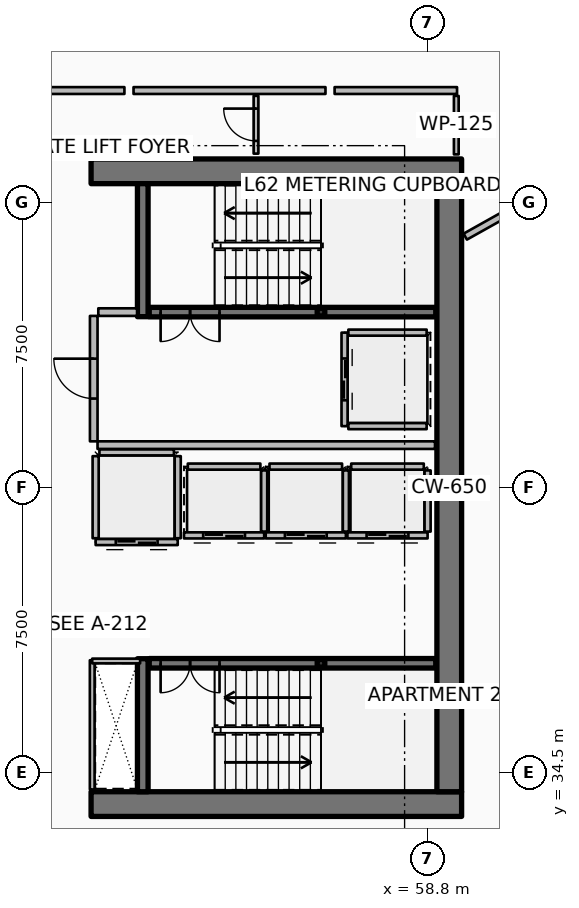
"""IFC4 building model, lengths in metres.
Left out: names, types, materials, properties, quantities, classifications, styles, units other than length and angle.
Written with IfcOpenShell. Run it as: python <this file> out.ifc"""

import sys

from ifc_helpers import new_model, si_unit, direction, frame, frame_2d, origin, origin_2d, place, context, subcontext, project, spatial, rectangle, hollow_rectangle, extrude, element, fill, save


model = new_model("IFC4")
c1 = context("Model", 3, precision=1e-05, world=origin(), true_north=direction((0.0, 1.0)))
c2 = subcontext(c1, "Body", "Model", "MODEL_VIEW")
j1 = project(units=[si_unit("LENGTHUNIT", "METRE"), si_unit("PLANEANGLEUNIT", "RADIAN")], contexts=[c1])
p1 = place(None, origin())
s1 = spatial("IfcSite", under=j1, at=p1, CompositionType="ELEMENT")
p2 = place(p1, origin())
s2 = spatial("IfcBuilding", under=s1, at=p2, CompositionType="ELEMENT")
p3 = place(p2, frame((0.0, 0.0, 248.25)))
s3 = spatial("IfcBuildingStorey", under=s2, at=p3, CompositionType="ELEMENT", Elevation=248.25)
for number, where, z_axis, x_axis in (
    (1, (49.95, 33.675, 0.0), (0.0, 0.0, 1.0), (1.0, 0.0, 0.0)),
    (2, (49.95, 50.325, 0.0), (0.0, 0.0, 1.0), (1.0, 0.0, 0.0)),
):
    element("IfcWall", number, at=place(p3, frame(where, z_axis=z_axis, x_axis=x_axis)), inside=s3, PredefinedType="SHEAR", context=c2, shape_type="SweptSolid", body=[
        extrude(rectangle(XDim=9.75, YDim=0.65, at=frame_2d((4.875, 0.0))), origin(), (0.0, 0.0, 1.0), 3.85),
    ])
p4 = place(p3, frame((59.375, 34.0, 0.0), z_axis=(0.0, 0.0, 1.0), x_axis=(0.0, 1.0, 0.0)))
e3 = element("IfcWall", 3, at=p4, inside=s3, PredefinedType="SHEAR", context=c2, shape_type="SweptSolid", body=[
    extrude(rectangle(XDim=16.0, YDim=0.65, at=frame_2d((8.0, 0.0))), origin(), (0.0, 0.0, 1.0), 3.85),
])
for number, where, z_axis, x_axis in (
    (4, (51.31, 46.5, 0.0), (0.0, 0.0, 1.0), (0.0, 1.0, 0.0)),
    (5, (51.31, 34.0, 0.0), (0.0, 0.0, 1.0), (0.0, 1.0, 0.0)),
):
    element("IfcWall", number, at=place(p3, frame(where, z_axis=z_axis, x_axis=x_axis)), inside=s3, PredefinedType="SHEAR", context=c2, shape_type="SweptSolid", body=[
        extrude(rectangle(XDim=3.5, YDim=0.28, at=frame_2d((1.75, 0.0))), origin(), (0.0, 0.0, 1.0), 3.85),
    ])
for number, where, z_axis, x_axis in (
    (6, (56.0, 46.62, 0.0), (0.0, 0.0, 1.0), (1.0, 0.0, 0.0)),
    (7, (56.0, 37.38, 0.0), (0.0, 0.0, 1.0), (1.0, 0.0, 0.0)),
):
    element("IfcColumn", number, at=place(p3, frame(where, z_axis=z_axis, x_axis=x_axis)), inside=s3, PredefinedType="COLUMN", context=c2, shape_type="SweptSolid", body=[
        extrude(hollow_rectangle(XDim=0.2, YDim=0.2, WallThickness=0.01, InnerFilletRadius=0.01, OuterFilletRadius=0.02, at=origin_2d()), origin(), (0.0, 0.0, 1.0), 1.72),
    ])
p5 = place(p3, frame((51.48, 46.62, 0.0), z_axis=(0.0, 0.0, 1.0), x_axis=(1.0, 0.0, 0.0)))
e8 = element("IfcWall", 8, at=p5, inside=s3, PredefinedType="SOLIDWALL", context=c2, shape_type="SweptSolid", body=[
    extrude(rectangle(XDim=7.54, YDim=0.25, at=frame_2d((3.77, 0.0))), origin(), (0.0, 0.0, 1.0), 3.59),
])
p6 = place(p5, frame((0.3, 0.0, 0.0)))
e9 = element("IfcOpeningElement", 9, at=p6, cuts=e8, PredefinedType="OPENING", context=c2, shape_type="SweptSolid", body=[
    extrude(rectangle(XDim=1.55, YDim=2.15, at=frame_2d((0.775, 1.075))), frame((0.0, 0.135, 0.0), z_axis=(0.0, -1.0, 0.0), x_axis=(1.0, 0.0, 0.0)), (0.0, 0.0, 1.0), 0.27),
])
p7 = place(p3, frame((51.48, 37.38, 0.0), z_axis=(0.0, 0.0, 1.0), x_axis=(1.0, 0.0, 0.0)))
e10 = element("IfcWall", 10, at=p7, inside=s3, PredefinedType="SOLIDWALL", context=c2, shape_type="SweptSolid", body=[
    extrude(rectangle(XDim=7.54, YDim=0.25, at=frame_2d((3.77, 0.0))), origin(), (0.0, 0.0, 1.0), 3.59),
])
p8 = place(p7, frame((0.3, 0.0, 0.0)))
e11 = element("IfcOpeningElement", 11, at=p8, cuts=e10, PredefinedType="OPENING", context=c2, shape_type="SweptSolid", body=[
    extrude(rectangle(XDim=1.55, YDim=2.15, at=frame_2d((0.775, 1.075))), frame((0.0, 0.135, 0.0), z_axis=(0.0, -1.0, 0.0), x_axis=(1.0, 0.0, 0.0)), (0.0, 0.0, 1.0), 0.27),
])
p9 = place(p3, frame((54.505, 40.745, 0.0), z_axis=(0.0, 0.0, 1.0), x_axis=(-1.0, 0.0, 0.0)))
e12 = element("IfcWall", 12, at=p9, inside=s3, PredefinedType="PARTITIONING", context=c2, shape_type="SweptSolid", body=[
    extrude(rectangle(XDim=2.11, YDim=0.16, at=frame_2d((1.055, 0.0))), origin(), (0.0, 0.0, 1.0), 3.59),
])
p10 = place(p9, frame((0.505, 0.0, 0.0)))
e13 = element("IfcOpeningElement", 13, at=p10, cuts=e12, PredefinedType="OPENING", context=c2, shape_type="SweptSolid", body=[
    extrude(rectangle(XDim=1.1, YDim=2.1, at=frame_2d((0.55, 1.05))), frame((0.0, 0.09, 0.0), z_axis=(0.0, -1.0, 0.0), x_axis=(1.0, 0.0, 0.0)), (0.0, 0.0, 1.0), 0.18),
])
p11 = place(p3, frame((54.505, 40.845, 0.0), z_axis=(0.0, 0.0, 1.0), x_axis=(0.0, 1.0, 0.0)))
e14 = element("IfcWall", 14, at=p11, inside=s3, PredefinedType="PARTITIONING", context=c2, shape_type="SweptSolid", body=[
    extrude(rectangle(XDim=1.61, YDim=0.16, at=frame_2d((0.805, 0.0))), origin(), (0.0, 0.0, 1.0), 3.59),
])
p12 = place(p3, frame((52.495, 42.555, 0.0), z_axis=(0.0, 0.0, 1.0), x_axis=(1.0, 0.0, 0.0)))
e15 = element("IfcWall", 15, at=p12, inside=s3, PredefinedType="PARTITIONING", context=c2, shape_type="SweptSolid", body=[
    extrude(rectangle(XDim=1.91, YDim=0.16, at=frame_2d((0.955, 0.0))), origin(), (0.0, 0.0, 1.0), 3.59),
])
p13 = place(p3, frame((56.655, 40.745, 0.0), z_axis=(0.0, 0.0, 1.0), x_axis=(-1.0, 0.0, 0.0)))
e16 = element("IfcWall", 16, at=p13, inside=s3, PredefinedType="PARTITIONING", context=c2, shape_type="SweptSolid", body=[
    extrude(rectangle(XDim=2.11, YDim=0.16, at=frame_2d((1.055, 0.0))), origin(), (0.0, 0.0, 1.0), 3.59),
])
p14 = place(p13, frame((0.505, 0.0, 0.0)))
e17 = element("IfcOpeningElement", 17, at=p14, cuts=e16, PredefinedType="OPENING", context=c2, shape_type="SweptSolid", body=[
    extrude(rectangle(XDim=1.1, YDim=2.1, at=frame_2d((0.55, 1.05))), frame((0.0, 0.09, 0.0), z_axis=(0.0, -1.0, 0.0), x_axis=(1.0, 0.0, 0.0)), (0.0, 0.0, 1.0), 0.18),
])
p15 = place(p3, frame((56.655, 40.845, 0.0), z_axis=(0.0, 0.0, 1.0), x_axis=(0.0, 1.0, 0.0)))
e18 = element("IfcWall", 18, at=p15, inside=s3, PredefinedType="PARTITIONING", context=c2, shape_type="SweptSolid", body=[
    extrude(rectangle(XDim=1.61, YDim=0.16, at=frame_2d((0.805, 0.0))), origin(), (0.0, 0.0, 1.0), 3.59),
])
p16 = place(p3, frame((54.645, 42.555, 0.0), z_axis=(0.0, 0.0, 1.0), x_axis=(1.0, 0.0, 0.0)))
e19 = element("IfcWall", 19, at=p16, inside=s3, PredefinedType="PARTITIONING", context=c2, shape_type="SweptSolid", body=[
    extrude(rectangle(XDim=1.91, YDim=0.16, at=frame_2d((0.955, 0.0))), origin(), (0.0, 0.0, 1.0), 3.59),
])
p17 = place(p3, frame((58.805, 40.745, 0.0), z_axis=(0.0, 0.0, 1.0), x_axis=(-1.0, 0.0, 0.0)))
e20 = element("IfcWall", 20, at=p17, inside=s3, PredefinedType="PARTITIONING", context=c2, shape_type="SweptSolid", body=[
    extrude(rectangle(XDim=2.11, YDim=0.16, at=frame_2d((1.055, 0.0))), origin(), (0.0, 0.0, 1.0), 3.59),
])
p18 = place(p17, frame((0.505, 0.0, 0.0)))
e21 = element("IfcOpeningElement", 21, at=p18, cuts=e20, PredefinedType="OPENING", context=c2, shape_type="SweptSolid", body=[
    extrude(rectangle(XDim=1.1, YDim=2.1, at=frame_2d((0.55, 1.05))), frame((0.0, 0.09, 0.0), z_axis=(0.0, -1.0, 0.0), x_axis=(1.0, 0.0, 0.0)), (0.0, 0.0, 1.0), 0.18),
])
p19 = place(p3, frame((58.805, 40.845, 0.0), z_axis=(0.0, 0.0, 1.0), x_axis=(0.0, 1.0, 0.0)))
e22 = element("IfcWall", 22, at=p19, inside=s3, PredefinedType="PARTITIONING", context=c2, shape_type="SweptSolid", body=[
    extrude(rectangle(XDim=1.61, YDim=0.16, at=frame_2d((0.805, 0.0))), origin(), (0.0, 0.0, 1.0), 3.59),
])
p20 = place(p3, frame((56.795, 42.555, 0.0), z_axis=(0.0, 0.0, 1.0), x_axis=(1.0, 0.0, 0.0)))
e23 = element("IfcWall", 23, at=p20, inside=s3, PredefinedType="PARTITIONING", context=c2, shape_type="SweptSolid", body=[
    extrude(rectangle(XDim=1.91, YDim=0.16, at=frame_2d((0.955, 0.0))), origin(), (0.0, 0.0, 1.0), 3.59),
])
p21 = place(p3, frame((56.62, 46.08, 0.0), z_axis=(0.0, 0.0, 1.0), x_axis=(0.0, -1.0, 0.0)))
e24 = element("IfcWall", 24, at=p21, inside=s3, PredefinedType="PARTITIONING", context=c2, shape_type="SweptSolid", body=[
    extrude(rectangle(XDim=2.46, YDim=0.16, at=frame_2d((1.23, 0.0))), origin(), (0.0, 0.0, 1.0), 3.59),
])
p22 = place(p21, frame((0.68, 0.0, 0.0)))
e25 = element("IfcOpeningElement", 25, at=p22, cuts=e24, PredefinedType="OPENING", context=c2, shape_type="SweptSolid", body=[
    extrude(rectangle(XDim=1.1, YDim=2.1, at=frame_2d((0.55, 1.05))), frame((0.0, 0.09, 0.0), z_axis=(0.0, -1.0, 0.0), x_axis=(1.0, 0.0, 0.0)), (0.0, 0.0, 1.0), 0.18),
])
for number, where, z_axis, x_axis in (
    (26, (56.72, 46.08, 0.0), (0.0, 0.0, 1.0), (1.0, 0.0, 0.0)),
    (27, (56.72, 43.62, 0.0), (0.0, 0.0, 1.0), (1.0, 0.0, 0.0)),
):
    element("IfcWall", number, at=place(p3, frame(where, z_axis=z_axis, x_axis=x_axis)), inside=s3, PredefinedType="PARTITIONING", context=c2, shape_type="SweptSolid", body=[
        extrude(rectangle(XDim=2.06, YDim=0.16, at=frame_2d((1.03, 0.0))), origin(), (0.0, 0.0, 1.0), 3.59),
    ])
p23 = place(p3, frame((52.23, 40.57, 0.0), z_axis=(0.0, 0.0, 1.0), x_axis=(-1.0, 0.0, 0.0)))
e28 = element("IfcWall", 28, at=p23, inside=s3, PredefinedType="PARTITIONING", context=c2, shape_type="SweptSolid", body=[
    extrude(rectangle(XDim=2.16, YDim=0.16, at=frame_2d((1.08, 0.0))), origin(), (0.0, 0.0, 1.0), 3.59),
])
p24 = place(p23, frame((0.53, 0.0, 0.0)))
e29 = element("IfcOpeningElement", 29, at=p24, cuts=e28, PredefinedType="OPENING", context=c2, shape_type="SweptSolid", body=[
    extrude(rectangle(XDim=1.1, YDim=2.1, at=frame_2d((0.55, 1.05))), frame((0.0, 0.09, 0.0), z_axis=(0.0, -1.0, 0.0), x_axis=(1.0, 0.0, 0.0)), (0.0, 0.0, 1.0), 0.18),
])
for number, where, z_axis, x_axis in (
    (30, (52.23, 40.67, 0.0), (0.0, 0.0, 1.0), (0.0, 1.0, 0.0)),
    (31, (50.07, 40.67, 0.0), (0.0, 0.0, 1.0), (0.0, 1.0, 0.0)),
):
    element("IfcWall", number, at=place(p3, frame(where, z_axis=z_axis, x_axis=x_axis)), inside=s3, PredefinedType="PARTITIONING", context=c2, shape_type="SweptSolid", body=[
        extrude(rectangle(XDim=2.16, YDim=0.16, at=frame_2d((1.08, 0.0))), origin(), (0.0, 0.0, 1.0), 3.59),
    ])
p25 = place(p3, frame((50.17, 42.93, 0.0), z_axis=(0.0, 0.0, 1.0), x_axis=(1.0, 0.0, 0.0)))
e32 = element("IfcWall", 32, at=p25, inside=s3, PredefinedType="PARTITIONING", context=c2, shape_type="SweptSolid", body=[
    extrude(rectangle(XDim=1.96, YDim=0.16, at=frame_2d((0.98, 0.0))), origin(), (0.0, 0.0, 1.0), 3.59),
])
p26 = place(p3, frame((50.12, 43.12, 0.0), z_axis=(0.0, 0.0, 1.0), x_axis=(1.0, 0.0, 0.0)))
e33 = element("IfcWall", 33, at=p26, inside=s3, PredefinedType="PARTITIONING", context=c2, shape_type="SweptSolid", body=[
    extrude(rectangle(XDim=8.88, YDim=0.2, at=frame_2d((4.44, 0.0))), origin(), (0.0, 0.0, 1.0), 3.59),
])
p27 = place(p3, frame((50.14, 46.62, 0.0), z_axis=(0.0, 0.0, 1.0), x_axis=(1.0, 0.0, 0.0)))
e34 = element("IfcWall", 34, at=p27, inside=s3, PredefinedType="PARTITIONING", context=c2, shape_type="SweptSolid", body=[
    extrude(rectangle(XDim=1.02, YDim=0.2, at=frame_2d((0.51, 0.0))), origin(), (0.0, 0.0, 1.0), 3.59),
])
p28 = place(p3, frame((50.02, 43.22, 0.0), z_axis=(0.0, 0.0, 1.0), x_axis=(0.0, 1.0, 0.0)))
e35 = element("IfcWall", 35, at=p28, inside=s3, PredefinedType="PARTITIONING", context=c2, shape_type="SweptSolid", body=[
    extrude(rectangle(XDim=3.3, YDim=0.2, at=frame_2d((1.65, 0.0))), origin(), (0.0, 0.0, 1.0), 3.59),
])
p29 = place(p28, frame((1.125, 0.0, 0.0)))
e36 = element("IfcOpeningElement", 36, at=p29, cuts=e35, PredefinedType="OPENING", context=c2, shape_type="SweptSolid", body=[
    extrude(rectangle(XDim=1.05, YDim=2.1, at=frame_2d((0.525, 1.05))), frame((0.0, 0.11, 0.0), z_axis=(0.0, -1.0, 0.0), x_axis=(1.0, 0.0, 0.0)), (0.0, 0.0, 1.0), 0.22),
])
p30 = place(p3, frame((49.98, 34.06, 0.0), z_axis=(0.0, 0.0, 1.0), x_axis=(0.0, 1.0, 0.0)))
e37 = element("IfcWall", 37, at=p30, inside=s3, PredefinedType="PARTITIONING", context=c2, shape_type="SweptSolid", body=[
    extrude(rectangle(XDim=3.4, YDim=0.125, at=frame_2d((1.7, 0.0))), origin(), (0.0, 0.0, 1.0), 3.03),
])
p31 = place(p3, frame((49.98, 37.44, 0.0), z_axis=(0.0, 0.0, 1.0), x_axis=(1.0, 0.0, 0.0)))
e38 = element("IfcWall", 38, at=p31, inside=s3, PredefinedType="PARTITIONING", context=c2, shape_type="SweptSolid", body=[
    extrude(rectangle(XDim=1.26, YDim=0.125, at=frame_2d((0.63, 0.0))), origin(), (0.0, 0.0, 1.0), 3.03),
])
p32 = place(p3, frame((59.56, 50.77, 0.0), z_axis=(0.0, 0.0, 1.0), x_axis=(0.0, 1.0, 0.0)))
e39 = element("IfcWall", 39, at=p32, inside=s3, PredefinedType="PARTITIONING", context=c2, shape_type="SweptSolid", body=[
    extrude(rectangle(XDim=1.54, YDim=0.125, at=frame_2d((0.77, 0.0))), origin(), (0.0, 0.0, 1.0), 3.03),
])
p33 = place(p3, frame((54.29, 50.79, 0.0), z_axis=(0.0, 0.0, 1.0), x_axis=(0.0, 1.0, 0.0)))
e40 = element("IfcWall", 40, at=p33, inside=s3, PredefinedType="PARTITIONING", context=c2, shape_type="SweptSolid", body=[
    extrude(rectangle(XDim=1.52, YDim=0.125, at=frame_2d((0.76, 0.0))), origin(), (0.0, 0.0, 1.0), 3.03),
])
p34 = place(p33, frame((0.335, 0.0, 0.0)))
e41 = element("IfcOpeningElement", 41, at=p34, cuts=e40, PredefinedType="OPENING", context=c2, shape_type="SweptSolid", body=[
    extrude(rectangle(XDim=0.85, YDim=2.06, at=frame_2d((0.425, 1.03))), frame((0.0, 0.073, 0.0), z_axis=(0.0, -1.0, 0.0), x_axis=(1.0, 0.0, 0.0)), (0.0, 0.0, 1.0), 0.145),
])
p35 = place(p3, frame((59.796, 48.606, 0.0), z_axis=(0.0, 0.0, 1.0), x_axis=(0.872493213488, 0.488626229767, 0.0)))
e42 = element("IfcWall", 42, at=p35, inside=s3, PredefinedType="PARTITIONING", context=c2, shape_type="SweptSolid", body=[
    extrude(rectangle(XDim=16.91, YDim=0.18, at=frame_2d((8.455, 0.0))), origin(), (0.0, 0.0, 1.0), 2.957),
])
p36 = place(p3, frame((59.58, 52.45, 0.0), z_axis=(0.0, 0.0, 1.0), x_axis=(-1.0, 0.0, 0.0)))
e43 = element("IfcWall", 43, at=p36, inside=s3, PredefinedType="PARTITIONING", context=c2, shape_type="SweptSolid", body=[
    extrude(rectangle(XDim=3.222, YDim=0.18, at=frame_2d((1.611, 0.0))), origin(), (0.0, 0.0, 1.0), 2.957),
])
p37 = place(p3, frame((62.2, 53.031, 0.0), z_axis=(0.0, 0.0, 1.0), x_axis=(-0.660650282497, 0.750693815238, 0.0)))
e44 = element("IfcWall", 44, at=p37, inside=s3, PredefinedType="PARTITIONING", context=c2, shape_type="SweptSolid", body=[
    extrude(rectangle(XDim=2.212, YDim=0.125, at=frame_2d((1.106, 0.0))), origin(), (0.0, 0.0, 1.0), 3.03),
])
p38 = place(p37, frame((0.681, 0.0, 0.0)))
e45 = element("IfcOpeningElement", 45, at=p38, cuts=e44, PredefinedType="OPENING", context=c2, shape_type="SweptSolid", body=[
    extrude(rectangle(XDim=0.85, YDim=2.06, at=frame_2d((0.425, 1.03))), frame((0.0, 0.073, 0.0), z_axis=(0.0, -1.0, 0.0), x_axis=(1.0, 0.0, 0.0)), (0.0, 0.0, 1.0), 0.145),
])
p39 = place(p3, frame((56.118, 52.45, 0.0), z_axis=(0.0, 0.0, 1.0), x_axis=(-1.0, 0.0, 0.0)))
e46 = element("IfcWall", 46, at=p39, inside=s3, PredefinedType="PARTITIONING", context=c2, shape_type="SweptSolid", body=[
    extrude(rectangle(XDim=5.051, YDim=0.18, at=frame_2d((2.525, 0.0))), origin(), (0.0, 0.0, 1.0), 2.957),
])
p40 = place(p3, frame((50.827, 52.45, 0.0), z_axis=(0.0, 0.0, 1.0), x_axis=(-1.0, 0.0, 0.0)))
e47 = element("IfcWall", 47, at=p40, inside=s3, PredefinedType="PARTITIONING", context=c2, shape_type="SweptSolid", body=[
    extrude(rectangle(XDim=3.944, YDim=0.18, at=frame_2d((1.972, 0.0))), origin(), (0.0, 0.0, 1.0), 2.957),
])
p41 = place(p6, origin())
e48 = element("IfcDoor", 48, at=p41, inside=s3, OperationType="DOUBLE_DOOR_SINGLE_SWING", PredefinedType="DOOR", context=c2, shape_type="SweptSolid", body=[
    extrude(rectangle(XDim=1.55, YDim=2.15, at=frame_2d((0.775, 1.075))), frame((0.0, 0.025, 0.0), z_axis=(0.0, -1.0, 0.0), x_axis=(1.0, 0.0, 0.0)), (0.0, 0.0, 1.0), 0.05),
])
fill(e9, e48)
p42 = place(p8, origin())
e49 = element("IfcDoor", 49, at=p42, inside=s3, OperationType="DOUBLE_DOOR_SINGLE_SWING", PredefinedType="DOOR", context=c2, shape_type="SweptSolid", body=[
    extrude(rectangle(XDim=1.55, YDim=2.15, at=frame_2d((0.775, 1.075))), frame((0.0, 0.025, 0.0), z_axis=(0.0, -1.0, 0.0), x_axis=(1.0, 0.0, 0.0)), (0.0, 0.0, 1.0), 0.05),
])
fill(e11, e49)
p43 = place(p10, origin())
e50 = element("IfcDoor", 50, at=p43, inside=s3, OperationType="DOUBLE_DOOR_SLIDING", PredefinedType="DOOR", context=c2, shape_type="SweptSolid", body=[
    extrude(rectangle(XDim=1.1, YDim=2.1, at=frame_2d((0.55, 1.05))), frame((0.0, 0.025, 0.0), z_axis=(0.0, -1.0, 0.0), x_axis=(1.0, 0.0, 0.0)), (0.0, 0.0, 1.0), 0.05),
])
fill(e13, e50)
p44 = place(p14, origin())
e51 = element("IfcDoor", 51, at=p44, inside=s3, OperationType="DOUBLE_DOOR_SLIDING", PredefinedType="DOOR", context=c2, shape_type="SweptSolid", body=[
    extrude(rectangle(XDim=1.1, YDim=2.1, at=frame_2d((0.55, 1.05))), frame((0.0, 0.025, 0.0), z_axis=(0.0, -1.0, 0.0), x_axis=(1.0, 0.0, 0.0)), (0.0, 0.0, 1.0), 0.05),
])
fill(e17, e51)
p45 = place(p18, origin())
e52 = element("IfcDoor", 52, at=p45, inside=s3, OperationType="DOUBLE_DOOR_SLIDING", PredefinedType="DOOR", context=c2, shape_type="SweptSolid", body=[
    extrude(rectangle(XDim=1.1, YDim=2.1, at=frame_2d((0.55, 1.05))), frame((0.0, 0.025, 0.0), z_axis=(0.0, -1.0, 0.0), x_axis=(1.0, 0.0, 0.0)), (0.0, 0.0, 1.0), 0.05),
])
fill(e21, e52)
p46 = place(p22, origin())
e53 = element("IfcDoor", 53, at=p46, inside=s3, OperationType="DOUBLE_DOOR_SLIDING", PredefinedType="DOOR", context=c2, shape_type="SweptSolid", body=[
    extrude(rectangle(XDim=1.1, YDim=2.1, at=frame_2d((0.55, 1.05))), frame((0.0, 0.025, 0.0), z_axis=(0.0, -1.0, 0.0), x_axis=(1.0, 0.0, 0.0)), (0.0, 0.0, 1.0), 0.05),
])
fill(e25, e53)
p47 = place(p24, origin())
e54 = element("IfcDoor", 54, at=p47, inside=s3, OperationType="DOUBLE_DOOR_SLIDING", PredefinedType="DOOR", context=c2, shape_type="SweptSolid", body=[
    extrude(rectangle(XDim=1.1, YDim=2.1, at=frame_2d((0.55, 1.05))), frame((0.0, 0.025, 0.0), z_axis=(0.0, -1.0, 0.0), x_axis=(1.0, 0.0, 0.0)), (0.0, 0.0, 1.0), 0.05),
])
fill(e29, e54)
p48 = place(p29, origin())
e55 = element("IfcDoor", 55, at=p48, inside=s3, OperationType="SINGLE_SWING_RIGHT", PredefinedType="DOOR", context=c2, shape_type="SweptSolid", body=[
    extrude(rectangle(XDim=1.05, YDim=2.1, at=frame_2d((0.525, 1.05))), frame((0.0, 0.025, 0.0), z_axis=(0.0, -1.0, 0.0), x_axis=(1.0, 0.0, 0.0)), (0.0, 0.0, 1.0), 0.05),
])
fill(e36, e55)
p49 = place(p34, origin())
e56 = element("IfcDoor", 56, at=p49, inside=s3, OperationType="SINGLE_SWING_RIGHT", PredefinedType="DOOR", context=c2, shape_type="SweptSolid", body=[
    extrude(rectangle(XDim=0.85, YDim=2.06, at=frame_2d((0.425, 1.03))), frame((0.0, 0.025, 0.0), z_axis=(0.0, -1.0, 0.0), x_axis=(1.0, 0.0, 0.0)), (0.0, 0.0, 1.0), 0.05),
])
fill(e41, e56)
save(model, sys.argv[1])
